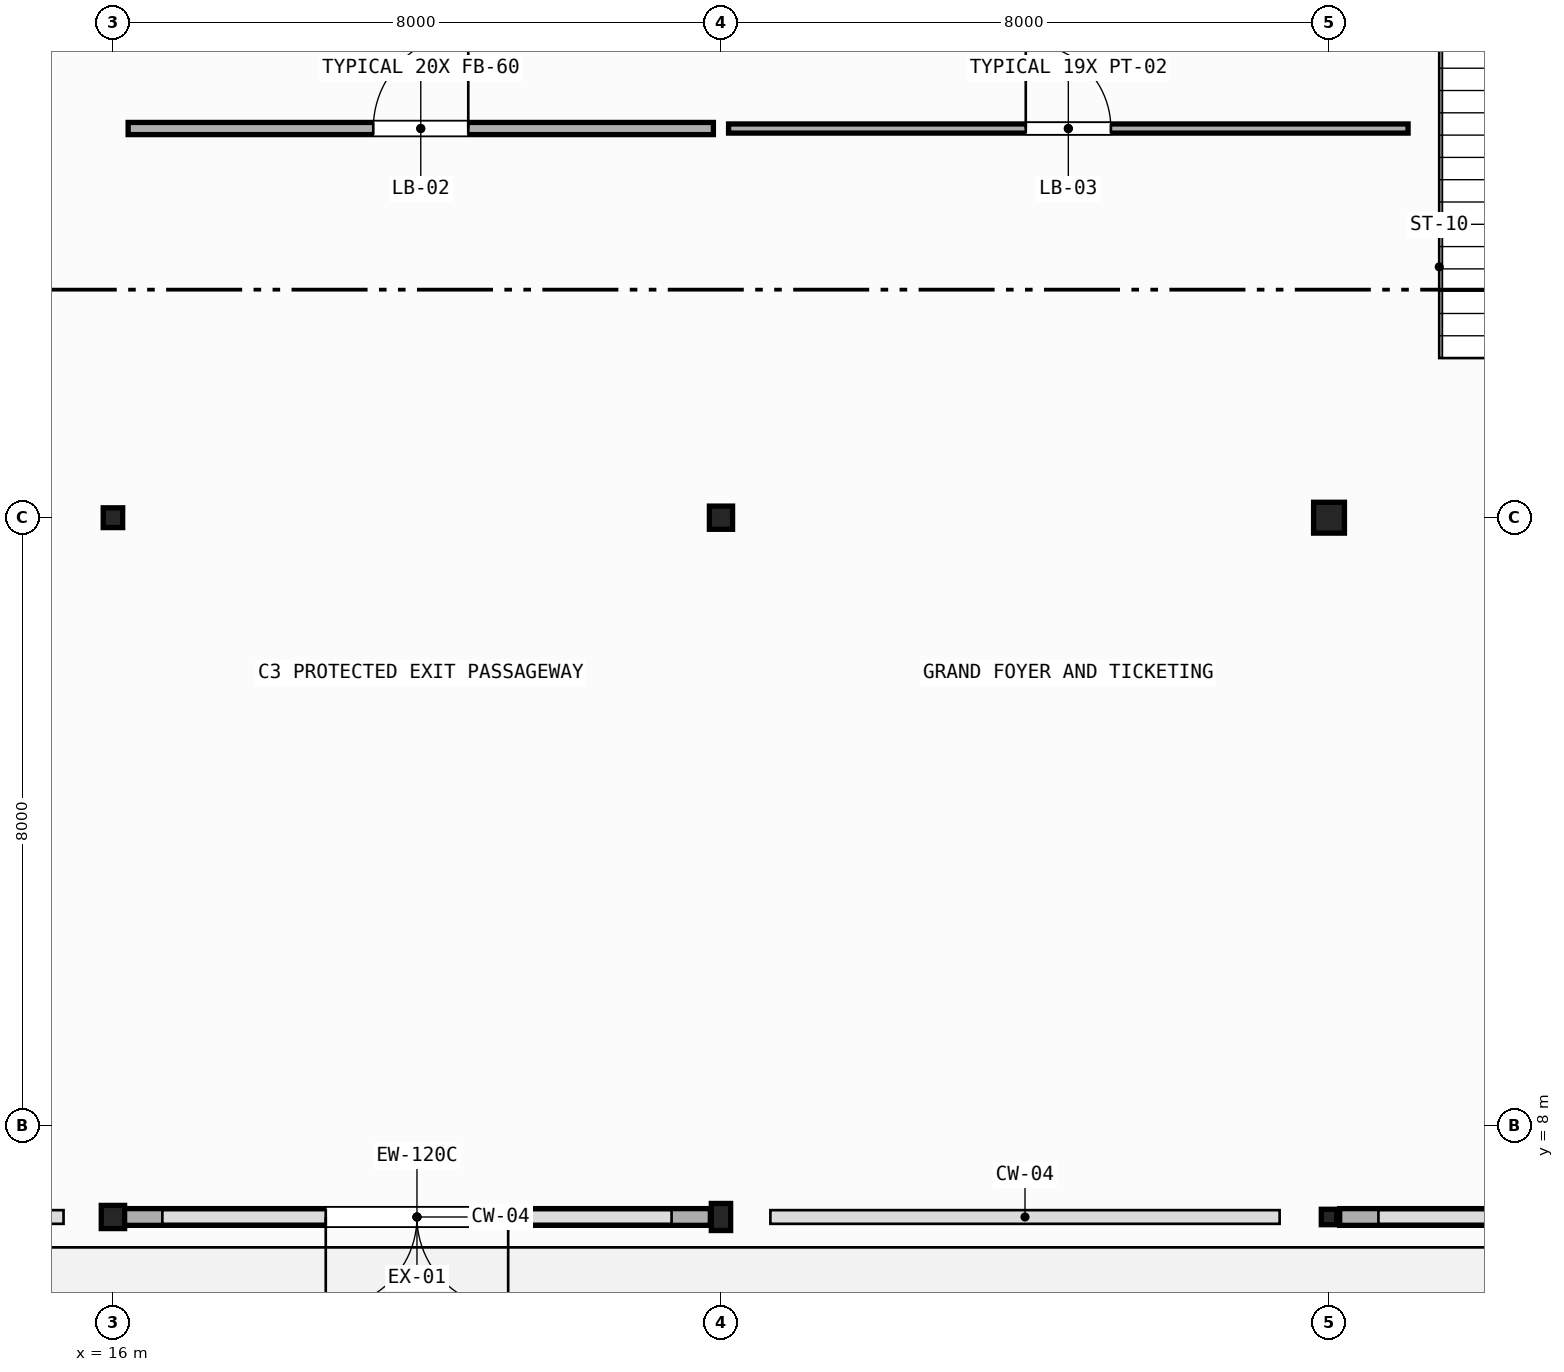
"""IFC4 building model, lengths in metres.
Left out: names, types, materials, properties, quantities, classifications, styles, units other than length and angle.
Written with IfcOpenShell. Run it as: python <this file> out.ifc"""

import sys

from ifc_helpers import new_model, si_unit, direction, frame, frame_2d, origin, origin_2d, place, context, subcontext, project, spatial, rectangle, hollow_rectangle, hollow_circle, i_section, extrude, element, fill, save


model = new_model("IFC4")
c1 = context("Model", 3, precision=1e-05, world=origin(), true_north=direction((0.0, 1.0)))
c2 = subcontext(c1, "Body", "Model", "MODEL_VIEW")
j1 = project(units=[si_unit("LENGTHUNIT", "METRE"), si_unit("PLANEANGLEUNIT", "RADIAN")], contexts=[c1])
p1 = place(None, origin())
s1 = spatial("IfcSite", under=j1, at=p1, CompositionType="ELEMENT")
p2 = place(p1, origin())
s2 = spatial("IfcBuilding", under=s1, at=p2, CompositionType="ELEMENT")
p3 = place(p2, origin())
s3 = spatial("IfcBuildingStorey", under=s2, at=p3, CompositionType="ELEMENT", Elevation=0.0)
p4 = place(p3, frame((16.0, 6.8, 0.0), z_axis=(0.0, 0.0, 1.0), x_axis=(0.0, 1.0, 0.0)))
e1 = element("IfcColumn", 1, at=p4, inside=s3, PredefinedType="COLUMN", context=c2, shape_type="SweptSolid", body=[
    extrude(i_section(OverallWidth=0.305, OverallDepth=0.307, WebThickness=0.01, FlangeThickness=0.015, FilletRadius=0.013, at=origin_2d()), origin(), (0.0, 0.0, 1.0), 5.4),
])
p5 = place(p3, frame((16.0, 16.0, 0.0), z_axis=(0.0, 0.0, 1.0), x_axis=(1.0, 0.0, 0.0)))
e2 = element("IfcColumn", 2, at=p5, inside=s3, PredefinedType="COLUMN", context=c2, shape_type="SweptSolid", body=[
    extrude(i_section(OverallWidth=0.256, OverallDepth=0.26, WebThickness=0.011, FlangeThickness=0.017, FilletRadius=0.011, at=origin_2d()), origin(), (0.0, 0.0, 1.0), 5.12),
])
p6 = place(p3, frame((24.0, 6.8, 0.0), z_axis=(0.0, 0.0, 1.0), x_axis=(1.0, 0.0, 0.0)))
e3 = element("IfcColumn", 3, at=p6, inside=s3, PredefinedType="COLUMN", context=c2, shape_type="SweptSolid", body=[
    extrude(hollow_rectangle(XDim=0.254, YDim=0.356, WallThickness=0.012, InnerFilletRadius=0.012, OuterFilletRadius=0.024, at=origin_2d()), origin(), (0.0, 0.0, 1.0), 5.4),
])
p7 = place(p3, frame((24.0, 16.0, 0.0), z_axis=(0.0, 0.0, 1.0), x_axis=(0.0, 1.0, 0.0)))
e4 = element("IfcColumn", 4, at=p7, inside=s3, PredefinedType="COLUMN", context=c2, shape_type="SweptSolid", body=[
    extrude(hollow_rectangle(XDim=0.305, YDim=0.305, WallThickness=0.012, InnerFilletRadius=0.012, OuterFilletRadius=0.024, at=origin_2d()), origin(), (0.0, 0.0, 1.0), 5.12),
])
p8 = place(p3, frame((32.0, 6.8, 0.0), z_axis=(0.0, 0.0, 1.0), x_axis=(0.0, 1.0, 0.0)))
e5 = element("IfcColumn", 5, at=p8, inside=s3, PredefinedType="COLUMN", context=c2, shape_type="SweptSolid", body=[
    extrude(hollow_rectangle(XDim=0.203, YDim=0.203, WallThickness=0.009, InnerFilletRadius=0.009, OuterFilletRadius=0.018, at=origin_2d()), origin(), (0.0, 0.0, 1.0), 5.4),
])
p9 = place(p3, frame((32.0, 16.0, 0.0), z_axis=(0.0, 0.0, 1.0), x_axis=(1.0, 0.0, 0.0)))
e6 = element("IfcColumn", 6, at=p9, inside=s3, PredefinedType="COLUMN", context=c2, shape_type="SweptSolid", body=[
    extrude(hollow_circle(Radius=0.203, WallThickness=0.012, at=origin_2d()), origin(), (0.0, 0.0, 1.0), 5.12),
])
p10 = place(p3, frame((23.86, 6.8, 0.0), z_axis=(0.0, 0.0, 1.0), x_axis=(-1.0, 0.0, 0.0)))
e7 = element("IfcWall", 7, at=p10, inside=s3, PredefinedType="STANDARD", context=c2, shape_type="SweptSolid", body=[
    extrude(rectangle(XDim=7.72, YDim=0.22, at=frame_2d((3.86, 0.0))), origin(), (0.0, 0.0, 1.0), 4.8),
])
p11 = place(p10, frame((2.66, 0.0, 0.0)))
e8 = element("IfcOpeningElement", 8, at=p11, cuts=e7, PredefinedType="OPENING", context=c2, shape_type="SweptSolid", body=[
    extrude(rectangle(XDim=2.4, YDim=2.7, at=frame_2d((1.2, 1.35))), frame((0.0, 0.12, 0.0), z_axis=(0.0, -1.0, 0.0), x_axis=(1.0, 0.0, 0.0)), (0.0, 0.0, 1.0), 0.24),
])
p12 = place(p3, frame((39.86, 6.8, 0.0), z_axis=(0.0, 0.0, 1.0), x_axis=(-1.0, 0.0, 0.0)))
e9 = element("IfcWall", 9, at=p12, inside=s3, PredefinedType="STANDARD", context=c2, shape_type="SweptSolid", body=[
    extrude(rectangle(XDim=7.72, YDim=0.22, at=frame_2d((3.86, 0.0))), origin(), (0.0, 0.0, 1.0), 4.8),
])
p13 = place(p12, frame((2.66, 0.0, 0.0)))
e10 = element("IfcOpeningElement", 10, at=p13, cuts=e9, PredefinedType="OPENING", context=c2, shape_type="SweptSolid", body=[
    extrude(rectangle(XDim=2.4, YDim=2.7, at=frame_2d((1.2, 1.35))), frame((0.0, 0.12, 0.0), z_axis=(0.0, -1.0, 0.0), x_axis=(1.0, 0.0, 0.0)), (0.0, 0.0, 1.0), 0.24),
])
p14 = place(p3, frame((16.2, 21.12, 0.0), z_axis=(0.0, 0.0, 1.0), x_axis=(1.0, 0.0, 0.0)))
e11 = element("IfcWall", 11, at=p14, inside=s3, PredefinedType="PARTITIONING", context=c2, shape_type="SweptSolid", body=[
    extrude(rectangle(XDim=7.7, YDim=0.16, at=frame_2d((3.85, 0.0))), origin(), (0.0, 0.0, 1.0), 4.29),
])
p15 = place(p14, frame((3.225, 0.0, 0.0)))
e12 = element("IfcOpeningElement", 12, at=p15, cuts=e11, PredefinedType="OPENING", context=c2, shape_type="SweptSolid", body=[
    extrude(rectangle(XDim=1.25, YDim=2.2, at=frame_2d((0.625, 1.1))), frame((0.0, 0.09, 0.0), z_axis=(0.0, -1.0, 0.0), x_axis=(1.0, 0.0, 0.0)), (0.0, 0.0, 1.0), 0.18),
])
p16 = place(p3, frame((24.1, 21.12, 0.0), z_axis=(0.0, 0.0, 1.0), x_axis=(1.0, 0.0, 0.0)))
e13 = element("IfcWall", 13, at=p16, inside=s3, PredefinedType="PARTITIONING", context=c2, shape_type="SweptSolid", body=[
    extrude(rectangle(XDim=8.94, YDim=0.12, at=frame_2d((4.47, 0.0))), origin(), (0.0, 0.0, 1.0), 4.29),
])
p17 = place(p16, frame((3.91, 0.0, 0.0)))
e14 = element("IfcOpeningElement", 14, at=p17, cuts=e13, PredefinedType="OPENING", context=c2, shape_type="SweptSolid", body=[
    extrude(rectangle(XDim=1.12, YDim=2.15, at=frame_2d((0.56, 1.075))), frame((0.0, 0.07, 0.0), z_axis=(0.0, -1.0, 0.0), x_axis=(1.0, 0.0, 0.0)), (0.0, 0.0, 1.0), 0.14),
])
p18 = place(p11, origin())
e15 = element("IfcDoor", 15, at=p18, inside=s3, OperationType="DOUBLE_DOOR_SINGLE_SWING", PredefinedType="DOOR", context=c2, shape_type="SweptSolid", body=[
    extrude(rectangle(XDim=2.4, YDim=2.7, at=frame_2d((1.2, 1.35))), frame((0.0, 0.025, 0.0), z_axis=(0.0, -1.0, 0.0), x_axis=(1.0, 0.0, 0.0)), (0.0, 0.0, 1.0), 0.05),
])
fill(e8, e15)
p19 = place(p15, origin())
e16 = element("IfcDoor", 16, at=p19, inside=s3, OperationType="SINGLE_SWING_RIGHT", PredefinedType="DOOR", context=c2, shape_type="SweptSolid", body=[
    extrude(rectangle(XDim=1.25, YDim=2.2, at=frame_2d((0.625, 1.1))), frame((0.0, 0.025, 0.0), z_axis=(0.0, -1.0, 0.0), x_axis=(1.0, 0.0, 0.0)), (0.0, 0.0, 1.0), 0.05),
])
fill(e12, e16)
p20 = place(p17, origin())
e17 = element("IfcDoor", 17, at=p20, inside=s3, OperationType="SINGLE_SWING_LEFT", PredefinedType="DOOR", context=c2, shape_type="SweptSolid", body=[
    extrude(rectangle(XDim=1.12, YDim=2.15, at=frame_2d((0.56, 1.075))), frame((0.0, 0.025, 0.0), z_axis=(0.0, -1.0, 0.0), x_axis=(1.0, 0.0, 0.0)), (0.0, 0.0, 1.0), 0.05),
])
fill(e14, e17)
save(model, sys.argv[1])
